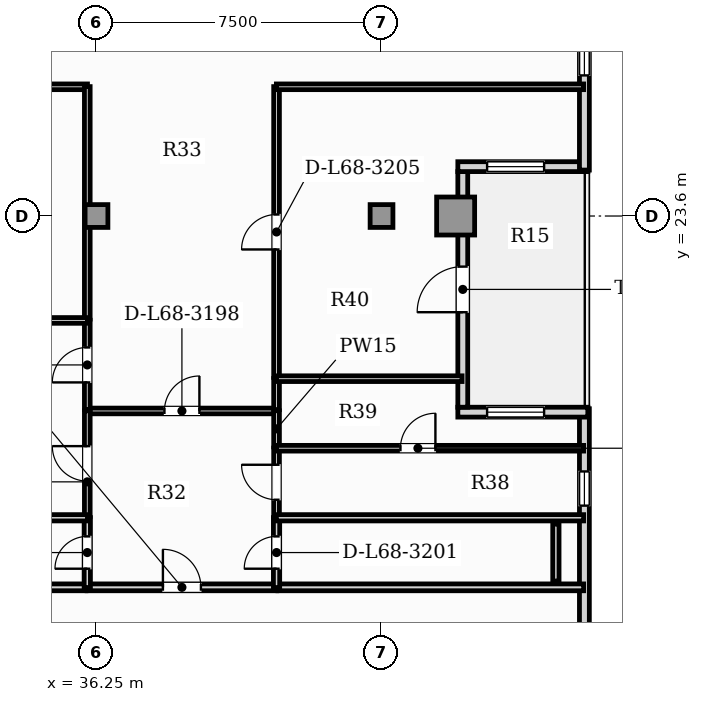
"""IFC4 building model, lengths in metres.
Left out: names, types, materials, properties, quantities, classifications, styles, units other than length and angle.
Written with IfcOpenShell. Run it as: python <this file> out.ifc"""

import sys

from ifc_helpers import new_model, si_unit, direction, frame, frame_2d, origin, origin_2d, place, context, subcontext, project, spatial, rectangle, hollow_rectangle, extrude, element, fill, save


model = new_model("IFC4")
c1 = context("Model", 3, precision=1e-05, world=origin(), true_north=direction((0.0, 1.0)))
c2 = subcontext(c1, "Body", "Model", "MODEL_VIEW")
j1 = project(units=[si_unit("LENGTHUNIT", "METRE"), si_unit("PLANEANGLEUNIT", "RADIAN")], contexts=[c1])
p1 = place(None, origin())
s1 = spatial("IfcSite", under=j1, at=p1, CompositionType="ELEMENT")
p2 = place(p1, origin())
s2 = spatial("IfcBuilding", under=s1, at=p2, CompositionType="ELEMENT")
p3 = place(p2, frame((0.0, 0.0, 276.0)))
s3 = spatial("IfcBuildingStorey", under=s2, at=p3, CompositionType="ELEMENT", Elevation=276.0)
p4 = place(p3, frame((45.7, 23.6, 0.0), z_axis=(0.0, 0.0, 1.0), x_axis=(1.0, 0.0, 0.0)))
e1 = element("IfcColumn", 1, at=p4, inside=s3, PredefinedType="USERDEFINED", context=c2, shape_type="SweptSolid", body=[
    extrude(hollow_rectangle(XDim=1.0, YDim=1.0, WallThickness=0.06, at=origin_2d()), origin(), (0.0, 0.0, 1.0), 5.05),
])
for number, where, z_axis, x_axis in (
    (2, (36.25, 23.6, 0.0), (0.0, 0.0, 1.0), (1.0, 0.0, 0.0)),
    (3, (43.75, 23.6, 0.0), (0.0, 0.0, 1.0), (1.0, 0.0, 0.0)),
):
    element("IfcColumn", number, at=place(p3, frame(where, z_axis=z_axis, x_axis=x_axis)), inside=s3, PredefinedType="COLUMN", context=c2, shape_type="SweptSolid", body=[
        extrude(rectangle(XDim=0.6, YDim=0.6, at=origin_2d()), origin(), (0.0, 0.0, 1.0), 5.05),
    ])
p5 = place(p3, frame((49.088, 3.24, 0.0), z_axis=(0.0, 0.0, 1.0), x_axis=(0.0, 1.0, 0.0)))
e4 = element("IfcWall", 4, at=p5, inside=s3, PredefinedType="SOLIDWALL", context=c2, shape_type="SweptSolid", body=[
    extrude(rectangle(XDim=15.289, YDim=0.26, at=frame_2d((7.645, 0.0))), origin(), (0.0, 0.0, 1.0), 4.85),
])
p6 = place(p5, frame((12.739, 0.0, 0.95)))
e5 = element("IfcOpeningElement", 5, at=p6, cuts=e4, PredefinedType="OPENING", context=c2, shape_type="SweptSolid", body=[
    extrude(rectangle(XDim=0.9, YDim=1.5, at=frame_2d((0.45, 0.75))), frame((0.0, 0.14, 0.0), z_axis=(0.0, -1.0, 0.0), x_axis=(1.0, 0.0, 0.0)), (0.0, 0.0, 1.0), 0.28),
])
p7 = place(p3, frame((49.178, 18.439, 0.0), z_axis=(0.0, 0.0, 1.0), x_axis=(-1.0, 0.0, 0.0)))
e6 = element("IfcWall", 6, at=p7, inside=s3, PredefinedType="SOLIDWALL", context=c2, shape_type="SweptSolid", body=[
    extrude(rectangle(XDim=3.42, YDim=0.26, at=frame_2d((1.71, 0.0))), origin(), (0.0, 0.0, 1.0), 4.85),
])
p8 = place(p7, frame((1.15, 0.0, 0.9)))
e7 = element("IfcOpeningElement", 7, at=p8, cuts=e6, PredefinedType="OPENING", context=c2, shape_type="SweptSolid", body=[
    extrude(rectangle(XDim=1.5, YDim=1.95, at=frame_2d((0.75, 0.975))), frame((0.0, 0.14, 0.0), z_axis=(0.0, -1.0, 0.0), x_axis=(1.0, 0.0, 0.0)), (0.0, 0.0, 1.0), 0.28),
])
p9 = place(p3, frame((45.888, 18.569, 0.0), z_axis=(0.0, 0.0, 1.0), x_axis=(0.0, 1.0, 0.0)))
e8 = element("IfcWall", 8, at=p9, inside=s3, PredefinedType="SOLIDWALL", context=c2, shape_type="SweptSolid", body=[
    extrude(rectangle(XDim=6.2, YDim=0.26, at=frame_2d((3.1, 0.0))), origin(), (0.0, 0.0, 1.0), 4.39),
])
p10 = place(p9, frame((2.5, 0.0, 0.0)))
e9 = element("IfcOpeningElement", 9, at=p10, cuts=e8, PredefinedType="OPENING", context=c2, shape_type="SweptSolid", body=[
    extrude(rectangle(XDim=1.2, YDim=2.2, at=frame_2d((0.6, 1.1))), frame((0.0, 0.14, 0.0), z_axis=(0.0, -1.0, 0.0), x_axis=(1.0, 0.0, 0.0)), (0.0, 0.0, 1.0), 0.28),
])
p11 = place(p3, frame((45.758, 24.899, 0.0), z_axis=(0.0, 0.0, 1.0), x_axis=(1.0, 0.0, 0.0)))
e10 = element("IfcWall", 10, at=p11, inside=s3, PredefinedType="SOLIDWALL", context=c2, shape_type="SweptSolid", body=[
    extrude(rectangle(XDim=3.42, YDim=0.26, at=frame_2d((1.71, 0.0))), origin(), (0.0, 0.0, 1.0), 4.85),
])
p12 = place(p11, frame((0.77, 0.0, 0.9)))
e11 = element("IfcOpeningElement", 11, at=p12, cuts=e10, PredefinedType="OPENING", context=c2, shape_type="SweptSolid", body=[
    extrude(rectangle(XDim=1.5, YDim=1.95, at=frame_2d((0.75, 0.975))), frame((0.0, 0.14, 0.0), z_axis=(0.0, -1.0, 0.0), x_axis=(1.0, 0.0, 0.0)), (0.0, 0.0, 1.0), 0.28),
])
p13 = place(p3, frame((49.088, 24.809, 0.0), z_axis=(0.0, 0.0, 1.0), x_axis=(0.0, 1.0, 0.0)))
e12 = element("IfcWall", 12, at=p13, inside=s3, PredefinedType="SOLIDWALL", context=c2, shape_type="SweptSolid", body=[
    extrude(rectangle(XDim=6.889, YDim=0.26, at=frame_2d((3.444, 0.0))), origin(), (0.0, 0.0, 1.0), 4.85),
])
p14 = place(p13, frame((2.491, 0.0, 0.95)))
e13 = element("IfcOpeningElement", 13, at=p14, cuts=e12, PredefinedType="OPENING", context=c2, shape_type="SweptSolid", body=[
    extrude(rectangle(XDim=0.9, YDim=1.5, at=frame_2d((0.45, 0.75))), frame((0.0, 0.14, 0.0), z_axis=(0.0, -1.0, 0.0), x_axis=(1.0, 0.0, 0.0)), (0.0, 0.0, 1.0), 0.28),
])
p15 = place(p13, frame((4.619, 0.0, 0.9)))
e14 = element("IfcOpeningElement", 14, at=p15, cuts=e12, PredefinedType="OPENING", context=c2, shape_type="SweptSolid", body=[
    extrude(rectangle(XDim=1.5, YDim=1.95, at=frame_2d((0.75, 0.975))), frame((0.0, 0.14, 0.0), z_axis=(0.0, -1.0, 0.0), x_axis=(1.0, 0.0, 0.0)), (0.0, 0.0, 1.0), 0.28),
])
p16 = place(p3, frame((36.003, 13.83, 0.0), z_axis=(0.0, 0.0, 1.0), x_axis=(1.0, 0.0, 0.0)))
e15 = element("IfcWall", 15, at=p16, inside=s3, PredefinedType="PARTITIONING", context=c2, shape_type="SweptSolid", body=[
    extrude(rectangle(XDim=4.99, YDim=0.18, at=frame_2d((2.495, 0.0))), origin(), (0.0, 0.0, 1.0), 4.85),
])
p17 = place(p16, frame((1.995, 0.0, 0.0)))
e16 = element("IfcOpeningElement", 16, at=p17, cuts=e15, PredefinedType="OPENING", context=c2, shape_type="SweptSolid", body=[
    extrude(rectangle(XDim=1.0, YDim=2.15, at=frame_2d((0.5, 1.075))), frame((0.0, 0.1, 0.0), z_axis=(0.0, -1.0, 0.0), x_axis=(1.0, 0.0, 0.0)), (0.0, 0.0, 1.0), 0.2),
])
p18 = place(p3, frame((28.438, 13.83, 0.0), z_axis=(0.0, 0.0, 1.0), x_axis=(1.0, 0.0, 0.0)))
e17 = element("IfcWall", 17, at=p18, inside=s3, PredefinedType="PARTITIONING", context=c2, shape_type="SweptSolid", body=[
    extrude(rectangle(XDim=7.535, YDim=0.18, at=frame_2d((3.768, 0.0))), origin(), (0.0, 0.0, 1.0), 4.85),
])
p19 = place(p3, frame((41.023, 13.83, 0.0), z_axis=(0.0, 0.0, 1.0), x_axis=(1.0, 0.0, 0.0)))
e18 = element("IfcWall", 18, at=p19, inside=s3, PredefinedType="PARTITIONING", context=c2, shape_type="SweptSolid", body=[
    extrude(rectangle(XDim=8.046, YDim=0.18, at=frame_2d((4.023, 0.0))), origin(), (0.0, 0.0, 1.0), 4.85),
])
p20 = place(p3, frame((36.003, 18.471, 0.0), z_axis=(0.0, 0.0, 1.0), x_axis=(1.0, 0.0, 0.0)))
e19 = element("IfcWall", 19, at=p20, inside=s3, PredefinedType="PARTITIONING", context=c2, shape_type="SweptSolid", body=[
    extrude(rectangle(XDim=4.99, YDim=0.15, at=frame_2d((2.495, 0.0))), origin(), (0.0, 0.0, 1.0), 4.85),
])
p21 = place(p20, frame((2.035, 0.0, 0.0)))
e20 = element("IfcOpeningElement", 20, at=p21, cuts=e19, PredefinedType="OPENING", context=c2, shape_type="SweptSolid", body=[
    extrude(rectangle(XDim=0.92, YDim=2.1, at=frame_2d((0.46, 1.05))), frame((0.0, 0.085, 0.0), z_axis=(0.0, -1.0, 0.0), x_axis=(1.0, 0.0, 0.0)), (0.0, 0.0, 1.0), 0.17),
])
p22 = place(p3, frame((36.008, 13.825, 0.0), z_axis=(0.0, 0.0, 1.0), x_axis=(0.0, 1.0, 0.0)))
e21 = element("IfcWall", 21, at=p22, inside=s3, PredefinedType="PLUMBINGWALL", context=c2, shape_type="SweptSolid", body=[
    extrude(rectangle(XDim=1.84, YDim=0.165, at=frame_2d((0.92, 0.0))), origin(), (0.0, 0.0, 1.0), 4.85),
])
p23 = place(p22, frame((0.495, 0.0, 0.0)))
e22 = element("IfcOpeningElement", 22, at=p23, cuts=e21, PredefinedType="OPENING", context=c2, shape_type="SweptSolid", body=[
    extrude(rectangle(XDim=0.85, YDim=2.1, at=frame_2d((0.425, 1.05))), frame((0.0, 0.093, 0.0), z_axis=(0.0, -1.0, 0.0), x_axis=(1.0, 0.0, 0.0)), (0.0, 0.0, 1.0), 0.185),
])
p24 = place(p3, frame((36.008, 15.695, 0.0), z_axis=(0.0, 0.0, 1.0), x_axis=(0.0, 1.0, 0.0)))
e23 = element("IfcWall", 23, at=p24, inside=s3, PredefinedType="PARTITIONING", context=c2, shape_type="SweptSolid", body=[
    extrude(rectangle(XDim=2.781, YDim=0.15, at=frame_2d((1.39, 0.0))), origin(), (0.0, 0.0, 1.0), 4.85),
])
p25 = place(p24, frame((0.93, 0.0, 0.0)))
e24 = element("IfcOpeningElement", 24, at=p25, cuts=e23, PredefinedType="OPENING", context=c2, shape_type="SweptSolid", body=[
    extrude(rectangle(XDim=0.92, YDim=2.1, at=frame_2d((0.46, 1.05))), frame((0.0, 0.085, 0.0), z_axis=(0.0, -1.0, 0.0), x_axis=(1.0, 0.0, 0.0)), (0.0, 0.0, 1.0), 0.17),
])
p26 = place(p3, frame((40.988, 13.825, 0.0), z_axis=(0.0, 0.0, 1.0), x_axis=(0.0, 1.0, 0.0)))
e25 = element("IfcWall", 25, at=p26, inside=s3, PredefinedType="PLUMBINGWALL", context=c2, shape_type="SweptSolid", body=[
    extrude(rectangle(XDim=1.84, YDim=0.165, at=frame_2d((0.92, 0.0))), origin(), (0.0, 0.0, 1.0), 4.85),
])
p27 = place(p26, frame((0.495, 0.0, 0.0)))
e26 = element("IfcOpeningElement", 26, at=p27, cuts=e25, PredefinedType="OPENING", context=c2, shape_type="SweptSolid", body=[
    extrude(rectangle(XDim=0.85, YDim=2.1, at=frame_2d((0.425, 1.05))), frame((0.0, 0.093, 0.0), z_axis=(0.0, -1.0, 0.0), x_axis=(1.0, 0.0, 0.0)), (0.0, 0.0, 1.0), 0.185),
])
p28 = place(p3, frame((40.988, 15.695, 0.0), z_axis=(0.0, 0.0, 1.0), x_axis=(0.0, 1.0, 0.0)))
e27 = element("IfcWall", 27, at=p28, inside=s3, PredefinedType="PARTITIONING", context=c2, shape_type="SweptSolid", body=[
    extrude(rectangle(XDim=1.8, YDim=0.15, at=frame_2d((0.9, 0.0))), origin(), (0.0, 0.0, 1.0), 4.85),
])
p29 = place(p28, frame((0.44, 0.0, 0.0)))
e28 = element("IfcOpeningElement", 28, at=p29, cuts=e27, PredefinedType="OPENING", context=c2, shape_type="SweptSolid", body=[
    extrude(rectangle(XDim=0.92, YDim=2.1, at=frame_2d((0.46, 1.05))), frame((0.0, 0.085, 0.0), z_axis=(0.0, -1.0, 0.0), x_axis=(1.0, 0.0, 0.0)), (0.0, 0.0, 1.0), 0.17),
])
p30 = place(p3, frame((40.988, 17.525, 0.0), z_axis=(0.0, 0.0, 1.0), x_axis=(0.0, 1.0, 0.0)))
e29 = element("IfcWall", 29, at=p30, inside=s3, PredefinedType="PARTITIONING", context=c2, shape_type="SweptSolid", body=[
    extrude(rectangle(XDim=0.951, YDim=0.15, at=frame_2d((0.476, 0.0))), origin(), (0.0, 0.0, 1.0), 4.85),
])
p31 = place(p3, frame((36.008, 18.506, 0.0), z_axis=(0.0, 0.0, 1.0), x_axis=(0.0, 1.0, 0.0)))
e30 = element("IfcWall", 30, at=p31, inside=s3, PredefinedType="PARTITIONING", context=c2, shape_type="SweptSolid", body=[
    extrude(rectangle(XDim=2.352, YDim=0.15, at=frame_2d((1.176, 0.0))), origin(), (0.0, 0.0, 1.0), 4.85),
])
p32 = place(p31, frame((0.716, 0.0, 0.0)))
e31 = element("IfcOpeningElement", 31, at=p32, cuts=e30, PredefinedType="OPENING", context=c2, shape_type="SweptSolid", body=[
    extrude(rectangle(XDim=0.92, YDim=2.1, at=frame_2d((0.46, 1.05))), frame((0.0, 0.085, 0.0), z_axis=(0.0, -1.0, 0.0), x_axis=(1.0, 0.0, 0.0)), (0.0, 0.0, 1.0), 0.17),
])
p33 = place(p3, frame((28.438, 27.0, 0.0), z_axis=(0.0, 0.0, 1.0), x_axis=(1.0, 0.0, 0.0)))
e32 = element("IfcWall", 32, at=p33, inside=s3, PredefinedType="PARTITIONING", context=c2, shape_type="SweptSolid", body=[
    extrude(rectangle(XDim=7.575, YDim=0.15, at=frame_2d((3.788, 0.0))), origin(), (0.0, 0.0, 1.0), 4.85),
])
p34 = place(p33, frame((3.328, 0.0, 0.0)))
e33 = element("IfcOpeningElement", 33, at=p34, cuts=e32, PredefinedType="OPENING", context=c2, shape_type="SweptSolid", body=[
    extrude(rectangle(XDim=0.92, YDim=2.1, at=frame_2d((0.46, 1.05))), frame((0.0, 0.085, 0.0), z_axis=(0.0, -1.0, 0.0), x_axis=(1.0, 0.0, 0.0)), (0.0, 0.0, 1.0), 0.17),
])
p35 = place(p3, frame((36.008, 20.888, 0.0), z_axis=(0.0, 0.0, 1.0), x_axis=(0.0, 1.0, 0.0)))
e34 = element("IfcWall", 34, at=p35, inside=s3, PredefinedType="PARTITIONING", context=c2, shape_type="SweptSolid", body=[
    extrude(rectangle(XDim=6.117, YDim=0.15, at=frame_2d((3.059, 0.0))), origin(), (0.0, 0.0, 1.0), 4.85),
])
p36 = place(p3, frame((40.988, 18.506, 0.0), z_axis=(0.0, 0.0, 1.0), x_axis=(0.0, 1.0, 0.0)))
e35 = element("IfcWall", 35, at=p36, inside=s3, PredefinedType="PARTITIONING", context=c2, shape_type="SweptSolid", body=[
    extrude(rectangle(XDim=0.819, YDim=0.15, at=frame_2d((0.41, 0.0))), origin(), (0.0, 0.0, 1.0), 4.85),
])
p37 = place(p3, frame((40.988, 19.355, 0.0), z_axis=(0.0, 0.0, 1.0), x_axis=(0.0, 1.0, 0.0)))
e36 = element("IfcWall", 36, at=p37, inside=s3, PredefinedType="PARTITIONING", context=c2, shape_type="SweptSolid", body=[
    extrude(rectangle(XDim=7.65, YDim=0.15, at=frame_2d((3.825, 0.0))), origin(), (0.0, 0.0, 1.0), 4.85),
])
p38 = place(p37, frame((3.365, 0.0, 0.0)))
e37 = element("IfcOpeningElement", 37, at=p38, cuts=e36, PredefinedType="OPENING", context=c2, shape_type="SweptSolid", body=[
    extrude(rectangle(XDim=0.92, YDim=2.1, at=frame_2d((0.46, 1.05))), frame((0.0, 0.085, 0.0), z_axis=(0.0, -1.0, 0.0), x_axis=(1.0, 0.0, 0.0)), (0.0, 0.0, 1.0), 0.17),
])
p39 = place(p3, frame((40.983, 27.0, 0.0), z_axis=(0.0, 0.0, 1.0), x_axis=(1.0, 0.0, 0.0)))
e38 = element("IfcWall", 38, at=p39, inside=s3, PredefinedType="PARTITIONING", context=c2, shape_type="SweptSolid", body=[
    extrude(rectangle(XDim=8.086, YDim=0.15, at=frame_2d((4.043, 0.0))), origin(), (0.0, 0.0, 1.0), 4.85),
])
p40 = place(p3, frame((28.438, 15.66, 0.0), z_axis=(0.0, 0.0, 1.0), x_axis=(1.0, 0.0, 0.0)))
e39 = element("IfcWall", 39, at=p40, inside=s3, PredefinedType="PLUMBINGWALL", context=c2, shape_type="SweptSolid", body=[
    extrude(rectangle(XDim=7.575, YDim=0.165, at=frame_2d((3.788, 0.0))), origin(), (0.0, 0.0, 1.0), 4.85),
])
p41 = place(p3, frame((28.398, 20.853, 0.0), z_axis=(0.0, 0.0, 1.0), x_axis=(1.0, 0.0, 0.0)))
e40 = element("IfcWall", 40, at=p41, inside=s3, PredefinedType="PARTITIONING", context=c2, shape_type="SweptSolid", body=[
    extrude(rectangle(XDim=7.615, YDim=0.15, at=frame_2d((3.808, 0.0))), origin(), (0.0, 0.0, 1.0), 4.85),
])
p42 = place(p3, frame((40.983, 15.66, 0.0), z_axis=(0.0, 0.0, 1.0), x_axis=(1.0, 0.0, 0.0)))
e41 = element("IfcWall", 41, at=p42, inside=s3, PredefinedType="PLUMBINGWALL", context=c2, shape_type="SweptSolid", body=[
    extrude(rectangle(XDim=8.086, YDim=0.165, at=frame_2d((4.043, 0.0))), origin(), (0.0, 0.0, 1.0), 4.85),
])
p43 = place(p3, frame((40.983, 17.49, 0.0), z_axis=(0.0, 0.0, 1.0), x_axis=(1.0, 0.0, 0.0)))
e42 = element("IfcWall", 42, at=p43, inside=s3, PredefinedType="PARTITIONING", context=c2, shape_type="SweptSolid", body=[
    extrude(rectangle(XDim=8.086, YDim=0.15, at=frame_2d((4.043, 0.0))), origin(), (0.0, 0.0, 1.0), 4.85),
])
p44 = place(p43, frame((3.265, 0.0, 0.0)))
e43 = element("IfcOpeningElement", 43, at=p44, cuts=e42, PredefinedType="OPENING", context=c2, shape_type="SweptSolid", body=[
    extrude(rectangle(XDim=0.92, YDim=2.1, at=frame_2d((0.46, 1.05))), frame((0.0, 0.085, 0.0), z_axis=(0.0, -1.0, 0.0), x_axis=(1.0, 0.0, 0.0)), (0.0, 0.0, 1.0), 0.17),
])
p45 = place(p3, frame((40.983, 19.32, 0.0), z_axis=(0.0, 0.0, 1.0), x_axis=(1.0, 0.0, 0.0)))
e44 = element("IfcWall", 44, at=p45, inside=s3, PredefinedType="PARTITIONING", context=c2, shape_type="SweptSolid", body=[
    extrude(rectangle(XDim=4.885, YDim=0.15, at=frame_2d((2.443, 0.0))), origin(), (0.0, 0.0, 1.0), 4.85),
])
p46 = place(p3, frame((48.338, 15.495, 0.0), z_axis=(0.0, 0.0, 1.0), x_axis=(0.0, -1.0, 0.0)))
e45 = element("IfcWall", 45, at=p46, inside=s3, PredefinedType="PLUMBINGWALL", context=c2, shape_type="SweptSolid", body=[
    extrude(rectangle(XDim=1.5, YDim=0.165, at=frame_2d((0.75, 0.0))), origin(), (0.0, 0.0, 1.0), 4.85),
])
p47 = place(p10, frame((1.2, 0.0, 0.0), z_axis=(0.0, 0.0, 1.0), x_axis=(-1.0, 0.0, 0.0)))
e46 = element("IfcDoor", 46, at=p47, inside=s3, OperationType="SINGLE_SWING_RIGHT", PredefinedType="DOOR", context=c2, shape_type="SweptSolid", body=[
    extrude(rectangle(XDim=1.2, YDim=2.2, at=frame_2d((0.6, 1.1))), frame((0.0, 0.025, 0.0), z_axis=(0.0, -1.0, 0.0), x_axis=(1.0, 0.0, 0.0)), (0.0, 0.0, 1.0), 0.05),
])
fill(e9, e46)
p48 = place(p14, origin())
e47 = element("IfcWindow", 47, at=p48, inside=s3, PartitioningType="SINGLE_PANEL", PredefinedType="WINDOW", context=c2, shape_type="SweptSolid", body=[
    extrude(rectangle(XDim=0.9, YDim=1.5, at=frame_2d((0.45, 0.75))), frame((0.0, 0.03, 0.0), z_axis=(0.0, -1.0, 0.0), x_axis=(1.0, 0.0, 0.0)), (0.0, 0.0, 1.0), 0.06),
])
fill(e13, e47)
p49 = place(p6, origin())
e48 = element("IfcWindow", 48, at=p49, inside=s3, PartitioningType="SINGLE_PANEL", PredefinedType="WINDOW", context=c2, shape_type="SweptSolid", body=[
    extrude(rectangle(XDim=0.9, YDim=1.5, at=frame_2d((0.45, 0.75))), frame((0.0, 0.03, 0.0), z_axis=(0.0, -1.0, 0.0), x_axis=(1.0, 0.0, 0.0)), (0.0, 0.0, 1.0), 0.06),
])
fill(e5, e48)
p50 = place(p8, origin())
e49 = element("IfcWindow", 49, at=p50, inside=s3, PartitioningType="SINGLE_PANEL", PredefinedType="WINDOW", context=c2, shape_type="SweptSolid", body=[
    extrude(rectangle(XDim=1.5, YDim=1.95, at=frame_2d((0.75, 0.975))), frame((0.0, 0.03, 0.0), z_axis=(0.0, -1.0, 0.0), x_axis=(1.0, 0.0, 0.0)), (0.0, 0.0, 1.0), 0.06),
])
fill(e7, e49)
p51 = place(p12, origin())
e50 = element("IfcWindow", 50, at=p51, inside=s3, PartitioningType="SINGLE_PANEL", PredefinedType="WINDOW", context=c2, shape_type="SweptSolid", body=[
    extrude(rectangle(XDim=1.5, YDim=1.95, at=frame_2d((0.75, 0.975))), frame((0.0, 0.03, 0.0), z_axis=(0.0, -1.0, 0.0), x_axis=(1.0, 0.0, 0.0)), (0.0, 0.0, 1.0), 0.06),
])
fill(e11, e50)
p52 = place(p17, origin())
e51 = element("IfcDoor", 51, at=p52, inside=s3, OperationType="SINGLE_SWING_LEFT", PredefinedType="DOOR", context=c2, shape_type="SweptSolid", body=[
    extrude(rectangle(XDim=1.0, YDim=2.15, at=frame_2d((0.5, 1.075))), frame((0.0, 0.025, 0.0), z_axis=(0.0, -1.0, 0.0), x_axis=(1.0, 0.0, 0.0)), (0.0, 0.0, 1.0), 0.05),
])
fill(e16, e51)
p53 = place(p21, origin())
e52 = element("IfcDoor", 52, at=p53, inside=s3, OperationType="SINGLE_SWING_RIGHT", PredefinedType="DOOR", context=c2, shape_type="SweptSolid", body=[
    extrude(rectangle(XDim=0.92, YDim=2.1, at=frame_2d((0.46, 1.05))), frame((0.0, 0.025, 0.0), z_axis=(0.0, -1.0, 0.0), x_axis=(1.0, 0.0, 0.0)), (0.0, 0.0, 1.0), 0.05),
])
fill(e20, e52)
p54 = place(p23, origin())
e53 = element("IfcDoor", 53, at=p54, inside=s3, OperationType="SINGLE_SWING_LEFT", PredefinedType="DOOR", context=c2, shape_type="SweptSolid", body=[
    extrude(rectangle(XDim=0.85, YDim=2.1, at=frame_2d((0.425, 1.05))), frame((0.0, 0.025, 0.0), z_axis=(0.0, -1.0, 0.0), x_axis=(1.0, 0.0, 0.0)), (0.0, 0.0, 1.0), 0.05),
])
fill(e22, e53)
p55 = place(p25, origin())
e54 = element("IfcDoor", 54, at=p55, inside=s3, OperationType="SINGLE_SWING_RIGHT", PredefinedType="DOOR", context=c2, shape_type="SweptSolid", body=[
    extrude(rectangle(XDim=0.92, YDim=2.1, at=frame_2d((0.46, 1.05))), frame((0.0, 0.025, 0.0), z_axis=(0.0, -1.0, 0.0), x_axis=(1.0, 0.0, 0.0)), (0.0, 0.0, 1.0), 0.05),
])
fill(e24, e54)
p56 = place(p27, origin())
e55 = element("IfcDoor", 55, at=p56, inside=s3, OperationType="SINGLE_SWING_LEFT", PredefinedType="DOOR", context=c2, shape_type="SweptSolid", body=[
    extrude(rectangle(XDim=0.85, YDim=2.1, at=frame_2d((0.425, 1.05))), frame((0.0, 0.025, 0.0), z_axis=(0.0, -1.0, 0.0), x_axis=(1.0, 0.0, 0.0)), (0.0, 0.0, 1.0), 0.05),
])
fill(e26, e55)
p57 = place(p29, origin())
e56 = element("IfcDoor", 56, at=p57, inside=s3, OperationType="SINGLE_SWING_RIGHT", PredefinedType="DOOR", context=c2, shape_type="SweptSolid", body=[
    extrude(rectangle(XDim=0.92, YDim=2.1, at=frame_2d((0.46, 1.05))), frame((0.0, 0.025, 0.0), z_axis=(0.0, -1.0, 0.0), x_axis=(1.0, 0.0, 0.0)), (0.0, 0.0, 1.0), 0.05),
])
fill(e28, e56)
p58 = place(p32, origin())
e57 = element("IfcDoor", 57, at=p58, inside=s3, OperationType="SINGLE_SWING_LEFT", PredefinedType="DOOR", context=c2, shape_type="SweptSolid", body=[
    extrude(rectangle(XDim=0.92, YDim=2.1, at=frame_2d((0.46, 1.05))), frame((0.0, 0.025, 0.0), z_axis=(0.0, -1.0, 0.0), x_axis=(1.0, 0.0, 0.0)), (0.0, 0.0, 1.0), 0.05),
])
fill(e31, e57)
p59 = place(p38, origin())
e58 = element("IfcDoor", 58, at=p59, inside=s3, OperationType="SINGLE_SWING_LEFT", PredefinedType="DOOR", context=c2, shape_type="SweptSolid", body=[
    extrude(rectangle(XDim=0.92, YDim=2.1, at=frame_2d((0.46, 1.05))), frame((0.0, 0.025, 0.0), z_axis=(0.0, -1.0, 0.0), x_axis=(1.0, 0.0, 0.0)), (0.0, 0.0, 1.0), 0.05),
])
fill(e37, e58)
p60 = place(p44, origin())
e59 = element("IfcDoor", 59, at=p60, inside=s3, OperationType="SINGLE_SWING_RIGHT", PredefinedType="DOOR", context=c2, shape_type="SweptSolid", body=[
    extrude(rectangle(XDim=0.92, YDim=2.1, at=frame_2d((0.46, 1.05))), frame((0.0, 0.025, 0.0), z_axis=(0.0, -1.0, 0.0), x_axis=(1.0, 0.0, 0.0)), (0.0, 0.0, 1.0), 0.05),
])
fill(e43, e59)
save(model, sys.argv[1])
